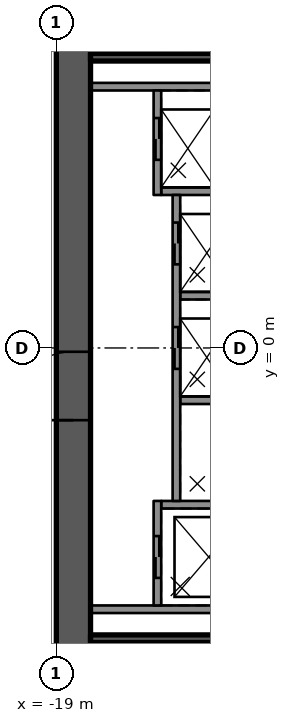
"""IFC4 building model, lengths in metres.
Left out: names, types, materials, properties, quantities, classifications, styles, units other than length and angle.
Written with IfcOpenShell. Run it as: python <this file> out.ifc"""

import sys

from ifc_helpers import new_model, si_unit, direction, frame, frame_2d, origin, place, context, subcontext, project, spatial, rectangle, extrude, element, fill, save


model = new_model("IFC4")
c1 = context("Model", 3, precision=1e-05, world=origin(), true_north=direction((0.0, 1.0)))
c2 = subcontext(c1, "Body", "Model", "MODEL_VIEW")
j1 = project(units=[si_unit("LENGTHUNIT", "METRE"), si_unit("PLANEANGLEUNIT", "RADIAN")], contexts=[c1])
p1 = place(None, origin())
s1 = spatial("IfcSite", under=j1, at=p1, CompositionType="ELEMENT")
p2 = place(p1, origin())
s2 = spatial("IfcBuilding", under=s1, at=p2, CompositionType="ELEMENT")
p3 = place(p2, frame((0.0, 0.0, 20.5)))
s3 = spatial("IfcBuildingStorey", under=s2, at=p3, CompositionType="ELEMENT", Elevation=20.5)
p4 = place(p3, frame((-18.55, -12.0, 0.0), z_axis=(0.0, 0.0, 1.0), x_axis=(0.0, 1.0, 0.0)))
e1 = element("IfcWall", 1, at=p4, inside=s3, PredefinedType="SHEAR", context=c2, shape_type="SweptSolid", body=[
    extrude(rectangle(XDim=24.0, YDim=0.9, at=frame_2d((12.0, 0.0))), origin(), (0.0, 0.0, 1.0), 4.6),
])
p5 = place(p4, frame((10.1, 0.0, 0.0)))
e2 = element("IfcOpeningElement", 2, at=p5, cuts=e1, PredefinedType="OPENING", context=c2, shape_type="SweptSolid", body=[
    extrude(rectangle(XDim=1.8, YDim=2.1, at=frame_2d((0.9, 1.05))), frame((0.0, 0.46, 0.0), z_axis=(0.0, -1.0, 0.0), x_axis=(1.0, 0.0, 0.0)), (0.0, 0.0, 1.0), 0.92),
])
for number, where, z_axis, x_axis in (
    (3, (-11.54, 6.875, 0.0), (0.0, 0.0, 1.0), (-1.0, 0.0, 0.0)),
    (4, (-11.54, -6.875, 0.0), (0.0, 0.0, 1.0), (-1.0, 0.0, 0.0)),
):
    element("IfcWall", number, at=place(p3, frame(where, z_axis=z_axis, x_axis=x_axis)), inside=s3, PredefinedType="SOLIDWALL", context=c2, shape_type="SweptSolid", body=[
        extrude(rectangle(XDim=6.56, YDim=0.2, at=frame_2d((3.28, 0.0))), origin(), (0.0, 0.0, 1.0), 4.18),
    ])
p6 = place(p3, frame((-11.54, -4.125, 0.0), z_axis=(0.0, 0.0, 1.0), x_axis=(-1.0, 0.0, 0.0)))
e5 = element("IfcWall", 5, at=p6, inside=s3, PredefinedType="SOLIDWALL", context=c2, shape_type="SweptSolid", body=[
    extrude(rectangle(XDim=4.7, YDim=0.2, at=frame_2d((2.35, 0.0))), origin(), (0.0, 0.0, 1.0), 4.18),
])
for number, where, z_axis, x_axis in (
    (6, (-11.54, -1.375, 0.0), (0.0, 0.0, 1.0), (-1.0, 0.0, 0.0)),
    (7, (-11.54, 1.375, 0.0), (0.0, 0.0, 1.0), (-1.0, 0.0, 0.0)),
):
    element("IfcWall", number, at=place(p3, frame(where, z_axis=z_axis, x_axis=x_axis)), inside=s3, PredefinedType="SOLIDWALL", context=c2, shape_type="SweptSolid", body=[
        extrude(rectangle(XDim=4.2, YDim=0.2, at=frame_2d((2.1, 0.0))), origin(), (0.0, 0.0, 1.0), 4.18),
    ])
p7 = place(p3, frame((-11.54, 4.125, 0.0), z_axis=(0.0, 0.0, 1.0), x_axis=(-1.0, 0.0, 0.0)))
e8 = element("IfcWall", 8, at=p7, inside=s3, PredefinedType="SOLIDWALL", context=c2, shape_type="SweptSolid", body=[
    extrude(rectangle(XDim=4.7, YDim=0.2, at=frame_2d((2.35, 0.0))), origin(), (0.0, 0.0, 1.0), 4.18),
])
p8 = place(p3, frame((-16.34, -6.775, 0.0), z_axis=(0.0, 0.0, 1.0), x_axis=(0.0, 1.0, 0.0)))
e9 = element("IfcWall", 9, at=p8, inside=s3, PredefinedType="SOLIDWALL", context=c2, shape_type="SweptSolid", body=[
    extrude(rectangle(XDim=2.75, YDim=0.2, at=frame_2d((1.375, 0.0))), origin(), (0.0, 0.0, 1.0), 4.18),
])
p9 = place(p8, frame((0.725, 0.0, 0.0)))
e10 = element("IfcOpeningElement", 10, at=p9, cuts=e9, PredefinedType="OPENING", context=c2, shape_type="SweptSolid", body=[
    extrude(rectangle(XDim=1.1, YDim=2.1, at=frame_2d((0.55, 1.05))), frame((0.0, 0.11, 0.0), z_axis=(0.0, -1.0, 0.0), x_axis=(1.0, 0.0, 0.0)), (0.0, 0.0, 1.0), 0.22),
])
p10 = place(p3, frame((-15.84, -4.025, 0.0), z_axis=(0.0, 0.0, 1.0), x_axis=(0.0, 1.0, 0.0)))
e11 = element("IfcWall", 11, at=p10, inside=s3, PredefinedType="SOLIDWALL", context=c2, shape_type="SweptSolid", body=[
    extrude(rectangle(XDim=8.05, YDim=0.2, at=frame_2d((4.025, 0.0))), origin(), (0.0, 0.0, 1.0), 4.18),
])
p11 = place(p10, frame((3.475, 0.0, 0.0)))
e12 = element("IfcOpeningElement", 12, at=p11, cuts=e11, PredefinedType="OPENING", context=c2, shape_type="SweptSolid", body=[
    extrude(rectangle(XDim=1.1, YDim=2.1, at=frame_2d((0.55, 1.05))), frame((0.0, 0.11, 0.0), z_axis=(0.0, -1.0, 0.0), x_axis=(1.0, 0.0, 0.0)), (0.0, 0.0, 1.0), 0.22),
])
p12 = place(p10, frame((6.225, 0.0, 0.0)))
e13 = element("IfcOpeningElement", 13, at=p12, cuts=e11, PredefinedType="OPENING", context=c2, shape_type="SweptSolid", body=[
    extrude(rectangle(XDim=1.1, YDim=2.1, at=frame_2d((0.55, 1.05))), frame((0.0, 0.11, 0.0), z_axis=(0.0, -1.0, 0.0), x_axis=(1.0, 0.0, 0.0)), (0.0, 0.0, 1.0), 0.22),
])
p13 = place(p3, frame((-16.34, 4.025, 0.0), z_axis=(0.0, 0.0, 1.0), x_axis=(0.0, 1.0, 0.0)))
e14 = element("IfcWall", 14, at=p13, inside=s3, PredefinedType="SOLIDWALL", context=c2, shape_type="SweptSolid", body=[
    extrude(rectangle(XDim=2.75, YDim=0.2, at=frame_2d((1.375, 0.0))), origin(), (0.0, 0.0, 1.0), 4.18),
])
p14 = place(p13, frame((0.925, 0.0, 0.0)))
e15 = element("IfcOpeningElement", 15, at=p14, cuts=e14, PredefinedType="OPENING", context=c2, shape_type="SweptSolid", body=[
    extrude(rectangle(XDim=1.1, YDim=2.1, at=frame_2d((0.55, 1.05))), frame((0.0, 0.11, 0.0), z_axis=(0.0, -1.0, 0.0), x_axis=(1.0, 0.0, 0.0)), (0.0, 0.0, 1.0), 0.22),
])
for number, where, z_axis, x_axis in (
    (16, (-11.54, 7.65, 0.0), (0.0, 0.0, 1.0), (-1.0, 0.0, 0.0)),
    (17, (-11.54, -7.65, 0.0), (0.0, 0.0, 1.0), (-1.0, 0.0, 0.0)),
):
    element("IfcWall", number, at=place(p3, frame(where, z_axis=z_axis, x_axis=x_axis)), inside=s3, PredefinedType="SOLIDWALL", context=c2, shape_type="SweptSolid", body=[
        extrude(rectangle(XDim=6.56, YDim=0.2, at=frame_2d((3.28, 0.0))), origin(), (0.0, 0.0, 1.0), 4.18),
    ])
p15 = place(p9, origin())
e18 = element("IfcDoor", 18, at=p15, inside=s3, OperationType="DOUBLE_DOOR_SLIDING", PredefinedType="DOOR", context=c2, shape_type="SweptSolid", body=[
    extrude(rectangle(XDim=1.1, YDim=2.1, at=frame_2d((0.55, 1.05))), frame((0.0, 0.025, 0.0), z_axis=(0.0, -1.0, 0.0), x_axis=(1.0, 0.0, 0.0)), (0.0, 0.0, 1.0), 0.05),
])
fill(e10, e18)
p16 = place(p11, origin())
e19 = element("IfcDoor", 19, at=p16, inside=s3, OperationType="DOUBLE_DOOR_SLIDING", PredefinedType="DOOR", context=c2, shape_type="SweptSolid", body=[
    extrude(rectangle(XDim=1.1, YDim=2.1, at=frame_2d((0.55, 1.05))), frame((0.0, 0.025, 0.0), z_axis=(0.0, -1.0, 0.0), x_axis=(1.0, 0.0, 0.0)), (0.0, 0.0, 1.0), 0.05),
])
fill(e12, e19)
p17 = place(p12, origin())
e20 = element("IfcDoor", 20, at=p17, inside=s3, OperationType="DOUBLE_DOOR_SLIDING", PredefinedType="DOOR", context=c2, shape_type="SweptSolid", body=[
    extrude(rectangle(XDim=1.1, YDim=2.1, at=frame_2d((0.55, 1.05))), frame((0.0, 0.025, 0.0), z_axis=(0.0, -1.0, 0.0), x_axis=(1.0, 0.0, 0.0)), (0.0, 0.0, 1.0), 0.05),
])
fill(e13, e20)
p18 = place(p14, origin())
e21 = element("IfcDoor", 21, at=p18, inside=s3, OperationType="DOUBLE_DOOR_SLIDING", PredefinedType="DOOR", context=c2, shape_type="SweptSolid", body=[
    extrude(rectangle(XDim=1.1, YDim=2.1, at=frame_2d((0.55, 1.05))), frame((0.0, 0.025, 0.0), z_axis=(0.0, -1.0, 0.0), x_axis=(1.0, 0.0, 0.0)), (0.0, 0.0, 1.0), 0.05),
])
fill(e15, e21)
p19 = place(p5, origin())
e22 = element("IfcDoor", 22, at=p19, inside=s3, OperationType="SINGLE_SWING_LEFT", PredefinedType="DOOR", context=c2, shape_type="SweptSolid", body=[
    extrude(rectangle(XDim=1.8, YDim=2.1, at=frame_2d((0.9, 1.05))), frame((0.0, 0.025, 0.0), z_axis=(0.0, -1.0, 0.0), x_axis=(1.0, 0.0, 0.0)), (0.0, 0.0, 1.0), 0.05),
])
fill(e2, e22)
save(model, sys.argv[1])
